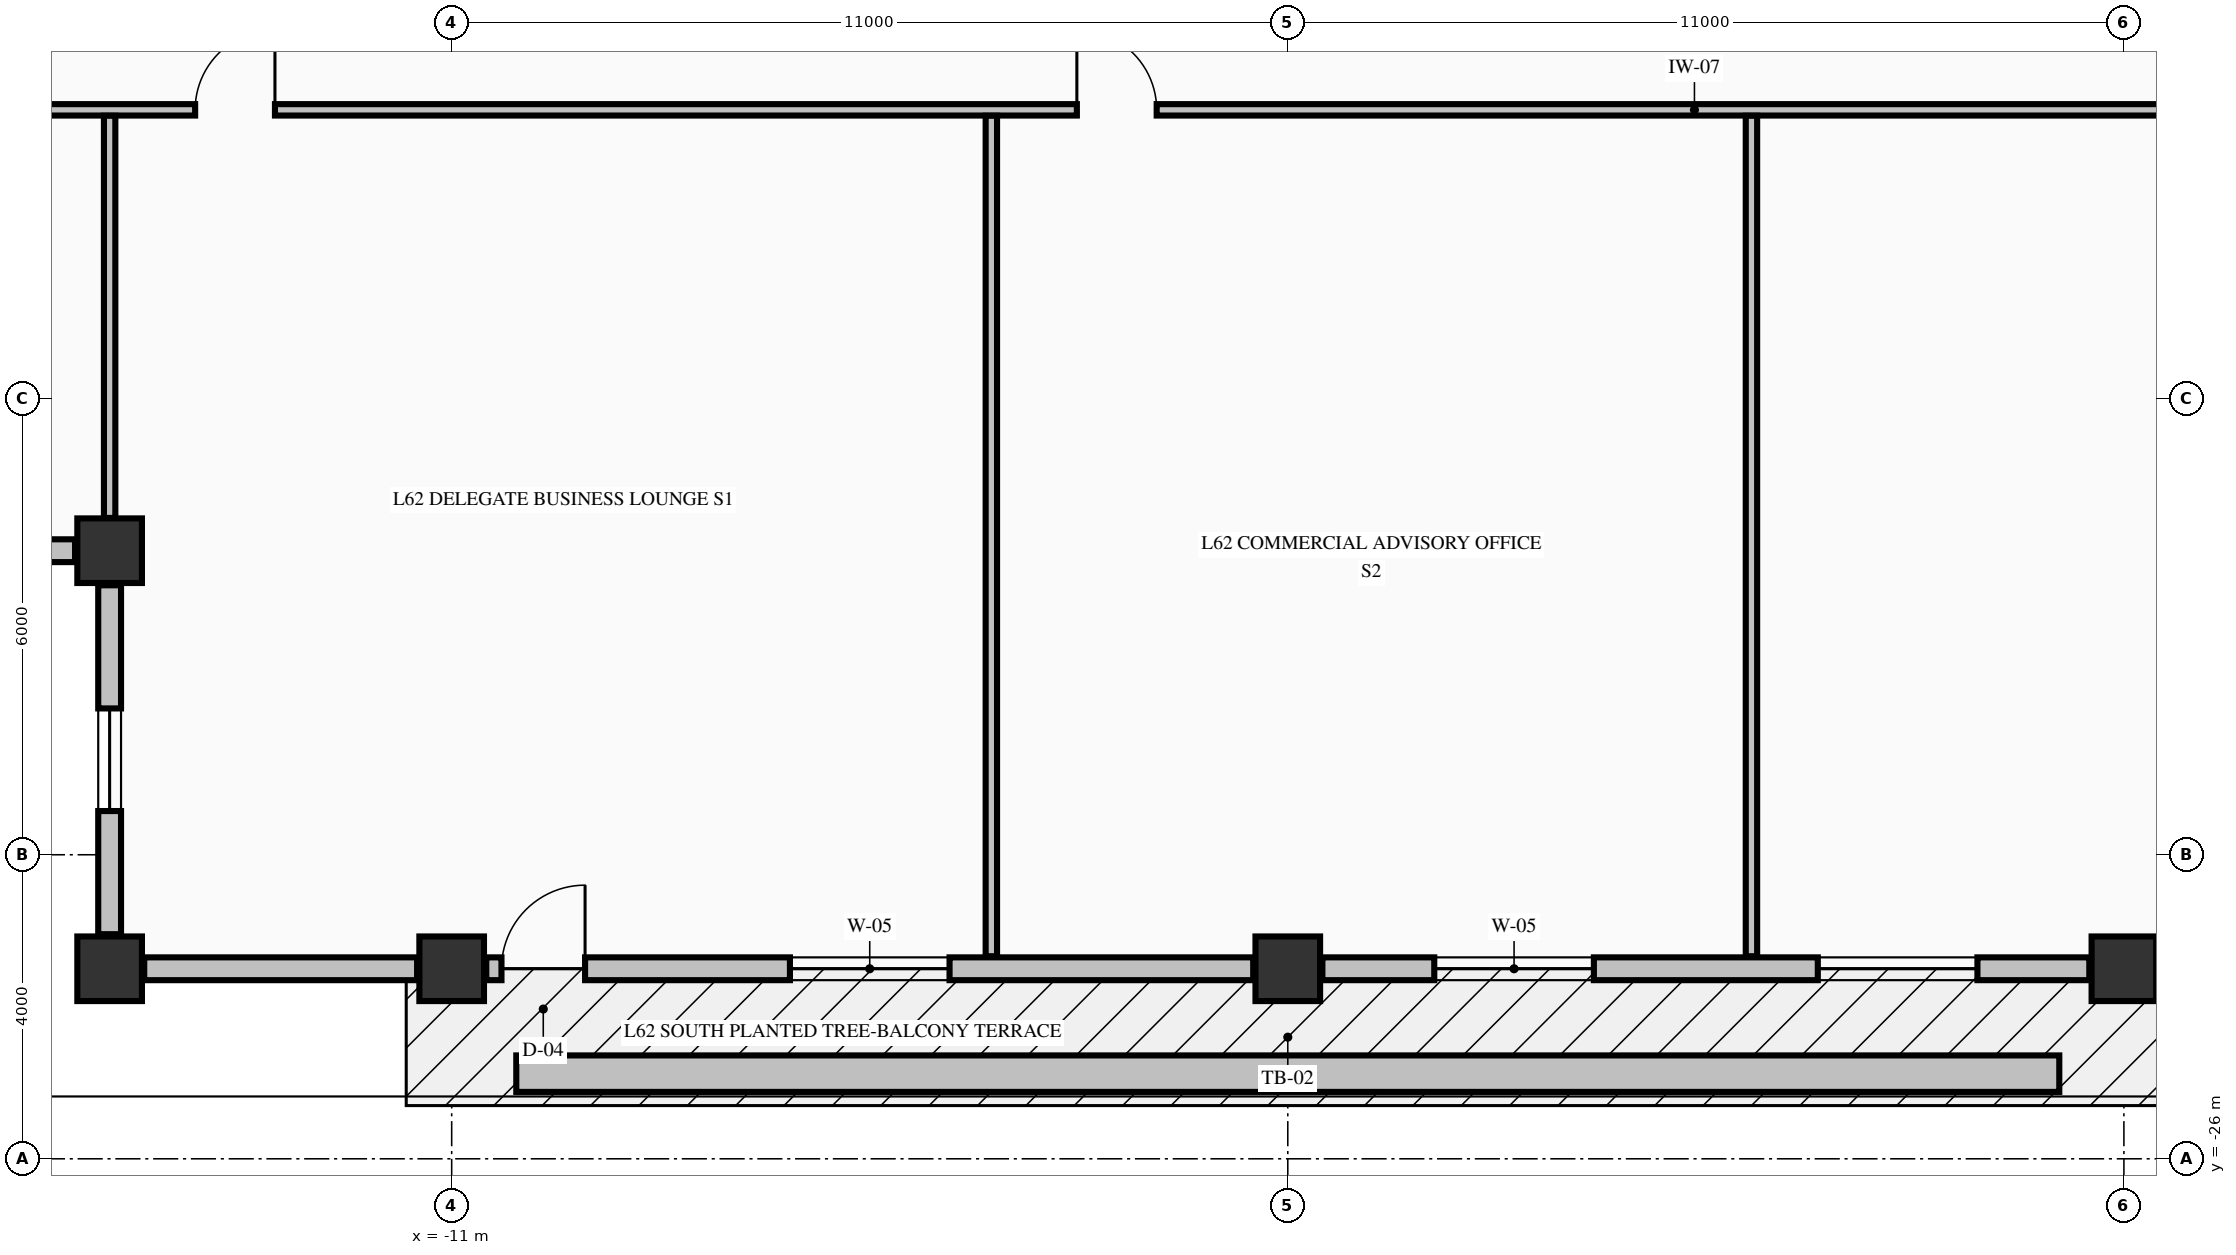
"""IFC4 building model, lengths in metres.
Left out: names, types, materials, properties, quantities, classifications, styles, units other than length and angle.
Written with IfcOpenShell. Run it as: python <this file> out.ifc"""

import sys

from ifc_helpers import new_model, si_unit, direction, frame, frame_2d, origin, origin_2d, place, context, subcontext, project, spatial, rectangle, extrude, element, fill, save


model = new_model("IFC4")
c1 = context("Model", 3, precision=1e-05, world=origin(), true_north=direction((0.0, 1.0)))
c2 = subcontext(c1, "Body", "Model", "MODEL_VIEW")
j1 = project(units=[si_unit("LENGTHUNIT", "METRE"), si_unit("PLANEANGLEUNIT", "RADIAN")], contexts=[c1])
p1 = place(None, origin())
s1 = spatial("IfcSite", under=j1, at=p1, CompositionType="ELEMENT")
p2 = place(p1, origin())
s2 = spatial("IfcBuilding", under=s1, at=p2, CompositionType="ELEMENT")
p3 = place(p2, frame((0.0, 0.0, 236.51)))
s3 = spatial("IfcBuildingStorey", under=s2, at=p3, CompositionType="ELEMENT", Elevation=236.51)
for number, where, z_axis, x_axis in (
    (1, (-15.5, -23.5, -0.25), (0.0, 0.0, 1.0), (1.0, 0.0, 0.0)),
    (2, (-11.0, -23.5, -0.25), (0.0, 0.0, 1.0), (1.0, 0.0, 0.0)),
    (3, (0.0, -23.5, -0.25), (0.0, 0.0, 1.0), (1.0, 0.0, 0.0)),
    (4, (11.0, -23.5, -0.25), (0.0, 0.0, 1.0), (1.0, 0.0, 0.0)),
    (5, (-15.5, -18.0, -0.25), (0.0, 0.0, 1.0), (1.0, 0.0, 0.0)),
):
    element("IfcColumn", number, at=place(p3, frame(where, z_axis=z_axis, x_axis=x_axis)), inside=s3, PredefinedType="COLUMN", context=c2, shape_type="SweptSolid", body=[
        extrude(rectangle(XDim=0.85, YDim=0.85, at=origin_2d()), origin(), (0.0, 0.0, 1.0), 3.23),
    ])
p4 = place(p3, frame((-20.545, -18.0, 0.0), z_axis=(0.0, 0.0, 1.0), x_axis=(1.0, 0.0, 0.0)))
e6 = element("IfcWall", 6, at=p4, inside=s3, PredefinedType="STANDARD", context=c2, shape_type="SweptSolid", body=[
    extrude(rectangle(XDim=4.59, YDim=0.3, at=frame_2d((2.295, 0.0))), origin(), (0.0, 0.0, 1.0), 2.372),
])
p5 = place(p4, frame((1.62, 0.0, 0.68)))
e7 = element("IfcOpeningElement", 7, at=p5, cuts=e6, PredefinedType="OPENING", context=c2, shape_type="SweptSolid", body=[
    extrude(rectangle(XDim=1.35, YDim=1.42, at=frame_2d((0.675, 0.71))), frame((0.0, 0.16, 0.0), z_axis=(0.0, -1.0, 0.0), x_axis=(1.0, 0.0, 0.0)), (0.0, 0.0, 1.0), 0.32),
])
p6 = place(p3, frame((-15.5, -18.455, 0.0), z_axis=(0.0, 0.0, 1.0), x_axis=(0.0, -1.0, 0.0)))
e8 = element("IfcWall", 8, at=p6, inside=s3, PredefinedType="STANDARD", context=c2, shape_type="SweptSolid", body=[
    extrude(rectangle(XDim=4.59, YDim=0.3, at=frame_2d((2.295, 0.0))), origin(), (0.0, 0.0, 1.0), 2.372),
])
p7 = place(p6, frame((1.62, 0.0, 0.68)))
e9 = element("IfcOpeningElement", 9, at=p7, cuts=e8, PredefinedType="OPENING", context=c2, shape_type="SweptSolid", body=[
    extrude(rectangle(XDim=1.35, YDim=1.42, at=frame_2d((0.675, 0.71))), frame((0.0, 0.16, 0.0), z_axis=(0.0, -1.0, 0.0), x_axis=(1.0, 0.0, 0.0)), (0.0, 0.0, 1.0), 0.32),
])
p8 = place(p3, frame((-15.045, -23.5, 0.0), z_axis=(0.0, 0.0, 1.0), x_axis=(1.0, 0.0, 0.0)))
e10 = element("IfcWall", 10, at=p8, inside=s3, PredefinedType="STANDARD", context=c2, shape_type="SweptSolid", body=[
    extrude(rectangle(XDim=3.59, YDim=0.3, at=frame_2d((1.795, 0.0))), origin(), (0.0, 0.0, 1.0), 2.372),
])
p9 = place(p3, frame((-10.545, -23.5, 0.0), z_axis=(0.0, 0.0, 1.0), x_axis=(1.0, 0.0, 0.0)))
e11 = element("IfcWall", 11, at=p9, inside=s3, PredefinedType="STANDARD", context=c2, shape_type="SweptSolid", body=[
    extrude(rectangle(XDim=10.09, YDim=0.3, at=frame_2d((5.045, 0.0))), origin(), (0.0, 0.0, 1.0), 2.372),
])
p10 = place(p9, frame((0.2, 0.0, 0.0)))
e12 = element("IfcOpeningElement", 12, at=p10, cuts=e11, PredefinedType="OPENING", context=c2, shape_type="SweptSolid", body=[
    extrude(rectangle(XDim=1.1, YDim=2.15, at=frame_2d((0.55, 1.075))), frame((0.0, 0.16, 0.0), z_axis=(0.0, -1.0, 0.0), x_axis=(1.0, 0.0, 0.0)), (0.0, 0.0, 1.0), 0.32),
])
p11 = place(p9, frame((3.995, 0.0, 0.7)))
e13 = element("IfcOpeningElement", 13, at=p11, cuts=e11, PredefinedType="OPENING", context=c2, shape_type="SweptSolid", body=[
    extrude(rectangle(XDim=2.1, YDim=1.5, at=frame_2d((1.05, 0.75))), frame((0.0, 0.16, 0.0), z_axis=(0.0, -1.0, 0.0), x_axis=(1.0, 0.0, 0.0)), (0.0, 0.0, 1.0), 0.32),
])
p12 = place(p3, frame((0.455, -23.5, 0.0), z_axis=(0.0, 0.0, 1.0), x_axis=(1.0, 0.0, 0.0)))
e14 = element("IfcWall", 14, at=p12, inside=s3, PredefinedType="STANDARD", context=c2, shape_type="SweptSolid", body=[
    extrude(rectangle(XDim=10.09, YDim=0.3, at=frame_2d((5.045, 0.0))), origin(), (0.0, 0.0, 1.0), 2.372),
])
p13 = place(p12, frame((1.472, 0.0, 0.7)))
e15 = element("IfcOpeningElement", 15, at=p13, cuts=e14, PredefinedType="OPENING", context=c2, shape_type="SweptSolid", body=[
    extrude(rectangle(XDim=2.1, YDim=1.5, at=frame_2d((1.05, 0.75))), frame((0.0, 0.16, 0.0), z_axis=(0.0, -1.0, 0.0), x_axis=(1.0, 0.0, 0.0)), (0.0, 0.0, 1.0), 0.32),
])
p14 = place(p12, frame((6.518, 0.0, 0.7)))
e16 = element("IfcOpeningElement", 16, at=p14, cuts=e14, PredefinedType="OPENING", context=c2, shape_type="SweptSolid", body=[
    extrude(rectangle(XDim=2.1, YDim=1.5, at=frame_2d((1.05, 0.75))), frame((0.0, 0.16, 0.0), z_axis=(0.0, -1.0, 0.0), x_axis=(1.0, 0.0, 0.0)), (0.0, 0.0, 1.0), 0.32),
])
p15 = place(p3, frame((-20.075, -12.2, 0.0), z_axis=(0.0, 0.0, 1.0), x_axis=(1.0, 0.0, 0.0)))
e17 = element("IfcWall", 17, at=p15, inside=s3, PredefinedType="PARTITIONING", context=c2, shape_type="SweptSolid", body=[
    extrude(rectangle(XDim=45.91, YDim=0.15, at=frame_2d((22.955, 0.0))), origin(), (0.0, 0.0, 1.0), 2.98),
])
p16 = place(p15, frame((5.7, 0.0, 0.0)))
e18 = element("IfcOpeningElement", 18, at=p16, cuts=e17, PredefinedType="OPENING", context=c2, shape_type="SweptSolid", body=[
    extrude(rectangle(XDim=1.05, YDim=2.15, at=frame_2d((0.525, 1.075))), frame((0.0, 0.085, 0.0), z_axis=(0.0, -1.0, 0.0), x_axis=(1.0, 0.0, 0.0)), (0.0, 0.0, 1.0), 0.17),
])
p17 = place(p15, frame((17.3, 0.0, 0.0)))
e19 = element("IfcOpeningElement", 19, at=p17, cuts=e17, PredefinedType="OPENING", context=c2, shape_type="SweptSolid", body=[
    extrude(rectangle(XDim=1.05, YDim=2.15, at=frame_2d((0.525, 1.075))), frame((0.0, 0.085, 0.0), z_axis=(0.0, -1.0, 0.0), x_axis=(1.0, 0.0, 0.0)), (0.0, 0.0, 1.0), 0.17),
])
p18 = place(p15, frame((32.5, 0.0, 0.0)))
e20 = element("IfcOpeningElement", 20, at=p18, cuts=e17, PredefinedType="OPENING", context=c2, shape_type="SweptSolid", body=[
    extrude(rectangle(XDim=1.05, YDim=2.15, at=frame_2d((0.525, 1.075))), frame((0.0, 0.085, 0.0), z_axis=(0.0, -1.0, 0.0), x_axis=(1.0, 0.0, 0.0)), (0.0, 0.0, 1.0), 0.17),
])
p19 = place(p3, frame((-15.5, -17.569, 0.0), z_axis=(0.0, 0.0, 1.0), x_axis=(0.0, 1.0, 0.0)))
e21 = element("IfcWall", 21, at=p19, inside=s3, PredefinedType="PARTITIONING", context=c2, shape_type="SweptSolid", body=[
    extrude(rectangle(XDim=5.291, YDim=0.15, at=frame_2d((2.646, 0.0))), origin(), (0.0, 0.0, 1.0), 2.98),
])
for number, where, z_axis, x_axis in (
    (22, (-3.9, -23.335, 0.0), (0.0, 0.0, 1.0), (0.0, 1.0, 0.0)),
    (23, (6.1, -23.335, 0.0), (0.0, 0.0, 1.0), (0.0, 1.0, 0.0)),
):
    element("IfcWall", number, at=place(p3, frame(where, z_axis=z_axis, x_axis=x_axis)), inside=s3, PredefinedType="PARTITIONING", context=c2, shape_type="SweptSolid", body=[
        extrude(rectangle(XDim=11.057, YDim=0.15, at=frame_2d((5.528, 0.0))), origin(), (0.0, 0.0, 1.0), 2.98),
    ])
p20 = place(p3, frame((-10.15, -24.88, -0.04), z_axis=(0.0, 0.0, 1.0), x_axis=(1.0, 0.0, 0.0)))
e24 = element("IfcWall", 24, at=p20, inside=s3, PredefinedType="PARAPET", context=c2, shape_type="SweptSolid", body=[
    extrude(rectangle(XDim=20.3, YDim=0.48, at=frame_2d((10.15, 0.0))), origin(), (0.0, 0.0, 1.0), 0.52),
])
p21 = place(p7, origin())
e25 = element("IfcWindow", 25, at=p21, inside=s3, PartitioningType="SINGLE_PANEL", PredefinedType="WINDOW", context=c2, shape_type="SweptSolid", body=[
    extrude(rectangle(XDim=1.35, YDim=1.42, at=frame_2d((0.675, 0.71))), frame((0.0, 0.03, 0.0), z_axis=(0.0, -1.0, 0.0), x_axis=(1.0, 0.0, 0.0)), (0.0, 0.0, 1.0), 0.06),
])
fill(e9, e25)
p22 = place(p10, origin())
e26 = element("IfcDoor", 26, at=p22, inside=s3, OperationType="SINGLE_SWING_RIGHT", PredefinedType="DOOR", context=c2, shape_type="SweptSolid", body=[
    extrude(rectangle(XDim=1.1, YDim=2.15, at=frame_2d((0.55, 1.075))), frame((0.0, 0.025, 0.0), z_axis=(0.0, -1.0, 0.0), x_axis=(1.0, 0.0, 0.0)), (0.0, 0.0, 1.0), 0.05),
])
fill(e12, e26)
p23 = place(p11, origin())
e27 = element("IfcWindow", 27, at=p23, inside=s3, PartitioningType="SINGLE_PANEL", PredefinedType="WINDOW", context=c2, shape_type="SweptSolid", body=[
    extrude(rectangle(XDim=2.1, YDim=1.5, at=frame_2d((1.05, 0.75))), frame((0.0, 0.03, 0.0), z_axis=(0.0, -1.0, 0.0), x_axis=(1.0, 0.0, 0.0)), (0.0, 0.0, 1.0), 0.06),
])
fill(e13, e27)
p24 = place(p13, origin())
e28 = element("IfcWindow", 28, at=p24, inside=s3, PartitioningType="SINGLE_PANEL", PredefinedType="WINDOW", context=c2, shape_type="SweptSolid", body=[
    extrude(rectangle(XDim=2.1, YDim=1.5, at=frame_2d((1.05, 0.75))), frame((0.0, 0.03, 0.0), z_axis=(0.0, -1.0, 0.0), x_axis=(1.0, 0.0, 0.0)), (0.0, 0.0, 1.0), 0.06),
])
fill(e15, e28)
p25 = place(p14, origin())
e29 = element("IfcWindow", 29, at=p25, inside=s3, PartitioningType="SINGLE_PANEL", PredefinedType="WINDOW", context=c2, shape_type="SweptSolid", body=[
    extrude(rectangle(XDim=2.1, YDim=1.5, at=frame_2d((1.05, 0.75))), frame((0.0, 0.03, 0.0), z_axis=(0.0, -1.0, 0.0), x_axis=(1.0, 0.0, 0.0)), (0.0, 0.0, 1.0), 0.06),
])
fill(e16, e29)
p26 = place(p16, origin())
e30 = element("IfcDoor", 30, at=p26, inside=s3, OperationType="SINGLE_SWING_RIGHT", PredefinedType="DOOR", context=c2, shape_type="SweptSolid", body=[
    extrude(rectangle(XDim=1.05, YDim=2.15, at=frame_2d((0.525, 1.075))), frame((0.0, 0.025, 0.0), z_axis=(0.0, -1.0, 0.0), x_axis=(1.0, 0.0, 0.0)), (0.0, 0.0, 1.0), 0.05),
])
fill(e18, e30)
p27 = place(p17, origin())
e31 = element("IfcDoor", 31, at=p27, inside=s3, OperationType="SINGLE_SWING_LEFT", PredefinedType="DOOR", context=c2, shape_type="SweptSolid", body=[
    extrude(rectangle(XDim=1.05, YDim=2.15, at=frame_2d((0.525, 1.075))), frame((0.0, 0.025, 0.0), z_axis=(0.0, -1.0, 0.0), x_axis=(1.0, 0.0, 0.0)), (0.0, 0.0, 1.0), 0.05),
])
fill(e19, e31)
save(model, sys.argv[1])
